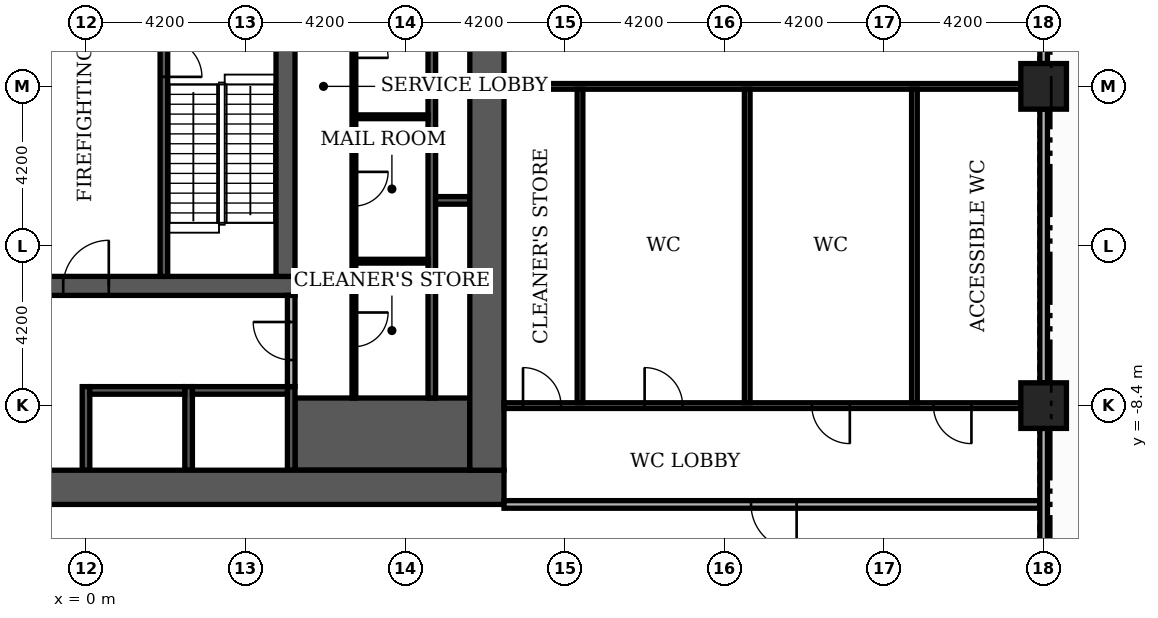
"""IFC4 building model, lengths in metres.
Left out: names, types, materials, properties, quantities, classifications, styles, units other than length and angle.
Written with IfcOpenShell. Run it as: python <this file> out.ifc"""

import sys

from ifc_helpers import new_model, si_unit, direction, frame, frame_2d, origin, origin_2d, place, context, subcontext, project, spatial, rectangle, extrude, element, fill, save


model = new_model("IFC4")
c1 = context("Model", 3, precision=1e-05, world=origin(), true_north=direction((0.0, 1.0)))
c2 = subcontext(c1, "Body", "Model", "MODEL_VIEW")
j1 = project(units=[si_unit("LENGTHUNIT", "METRE"), si_unit("PLANEANGLEUNIT", "RADIAN")], contexts=[c1])
p1 = place(None, origin())
s1 = spatial("IfcSite", under=j1, at=p1, CompositionType="ELEMENT")
p2 = place(p1, origin())
s2 = spatial("IfcBuilding", under=s1, at=p2, CompositionType="ELEMENT")
p3 = place(p2, frame((0.0, 0.0, 16.8)))
s3 = spatial("IfcBuildingStorey", under=s2, at=p3, CompositionType="ELEMENT", Elevation=16.8)
p4 = place(p3, frame((-5.5, -5.25, 0.0), z_axis=(0.0, 0.0, 1.0), x_axis=(1.0, 0.0, 0.0)))
e1 = element("IfcWall", 1, at=p4, inside=s3, PredefinedType="SHEAR", context=c2, shape_type="SweptSolid", body=[
    extrude(rectangle(XDim=11.0, YDim=0.5, at=frame_2d((5.5, 0.0))), origin(), (0.0, 0.0, 1.0), 4.98),
])
p5 = place(p4, frame((4.9, 0.0, 0.0)))
e2 = element("IfcOpeningElement", 2, at=p5, cuts=e1, PredefinedType="OPENING", context=c2, shape_type="SweptSolid", body=[
    extrude(rectangle(XDim=1.2, YDim=2.1, at=frame_2d((0.6, 1.05))), frame((0.0, 0.26, 0.0), z_axis=(0.0, -1.0, 0.0), x_axis=(1.0, 0.0, 0.0)), (0.0, 0.0, 1.0), 0.52),
])
p6 = place(p3, frame((5.25, -5.0, 0.0), z_axis=(0.0, 0.0, 1.0), x_axis=(0.0, 1.0, 0.0)))
e3 = element("IfcWall", 3, at=p6, inside=s3, PredefinedType="SHEAR", context=c2, shape_type="SweptSolid", body=[
    extrude(rectangle(XDim=10.5, YDim=0.5, at=frame_2d((5.25, 0.0))), origin(), (0.0, 0.0, 1.0), 4.98),
])
p7 = place(p3, frame((5.5, -9.15, 0.0), z_axis=(0.0, 0.0, 1.0), x_axis=(1.0, 0.0, 0.0)))
e4 = element("IfcWall", 4, at=p7, inside=s3, PredefinedType="SHEAR", context=c2, shape_type="SweptSolid", body=[
    extrude(rectangle(XDim=4.6, YDim=1.9, at=frame_2d((2.3, 0.0))), origin(), (0.0, 0.0, 1.0), 4.98),
])
p8 = place(p3, frame((2.05, -5.0, 0.0), z_axis=(0.0, 0.0, 1.0), x_axis=(0.0, 1.0, 0.0)))
e5 = element("IfcWall", 5, at=p8, inside=s3, PredefinedType="SHEAR", context=c2, shape_type="SweptSolid", body=[
    extrude(rectangle(XDim=6.6, YDim=0.2, at=frame_2d((3.3, 0.0))), origin(), (0.0, 0.0, 1.0), 4.98),
])
p9 = place(p8, frame((5.25, 0.0, 0.0)))
e6 = element("IfcOpeningElement", 6, at=p9, cuts=e5, PredefinedType="OPENING", context=c2, shape_type="SweptSolid", body=[
    extrude(rectangle(XDim=1.0, YDim=2.1, at=frame_2d((0.5, 1.05))), frame((0.0, 0.11, 0.0), z_axis=(0.0, -1.0, 0.0), x_axis=(1.0, 0.0, 0.0)), (0.0, 0.0, 1.0), 0.22),
])
for number, where, z_axis, x_axis in (
    (7, (0.0, -10.1, 0.0), (0.0, 0.0, 1.0), (0.0, 1.0, 0.0)),
    (8, (2.7, -10.1, 0.0), (0.0, 0.0, 1.0), (0.0, 1.0, 0.0)),
    (9, (5.4, -10.1, 0.0), (0.0, 0.0, 1.0), (0.0, 1.0, 0.0)),
):
    element("IfcWall", number, at=place(p3, frame(where, z_axis=z_axis, x_axis=x_axis)), inside=s3, PredefinedType="SHEAR", context=c2, shape_type="SweptSolid", body=[
        extrude(rectangle(XDim=2.2, YDim=0.2, at=frame_2d((1.1, 0.0))), origin(), (0.0, 0.0, 1.0), 4.98),
    ])
p10 = place(p3, frame((9.1, -8.2, 0.0), z_axis=(0.0, 0.0, 1.0), x_axis=(0.0, 1.0, 0.0)))
e10 = element("IfcWall", 10, at=p10, inside=s3, PredefinedType="SHEAR", context=c2, shape_type="SweptSolid", body=[
    extrude(rectangle(XDim=16.4, YDim=0.2, at=frame_2d((8.2, 0.0))), origin(), (0.0, 0.0, 1.0), 4.98),
])
for number, where, z_axis, x_axis in (
    (11, (0.1, -8.0, 0.0), (0.0, 0.0, 1.0), (1.0, 0.0, 0.0)),
    (12, (2.8, -8.0, 0.0), (0.0, 0.0, 1.0), (1.0, 0.0, 0.0)),
):
    element("IfcWall", number, at=place(p3, frame(where, z_axis=z_axis, x_axis=x_axis)), inside=s3, PredefinedType="SHEAR", context=c2, shape_type="SweptSolid", body=[
        extrude(rectangle(XDim=2.5, YDim=0.2, at=frame_2d((1.25, 0.0))), origin(), (0.0, 0.0, 1.0), 4.98),
    ])
p11 = place(p3, frame((9.2, -3.0, 0.0), z_axis=(0.0, 0.0, 1.0), x_axis=(1.0, 0.0, 0.0)))
e13 = element("IfcWall", 13, at=p11, inside=s3, PredefinedType="SHEAR", context=c2, shape_type="SweptSolid", body=[
    extrude(rectangle(XDim=0.9, YDim=0.2, at=frame_2d((0.45, 0.0))), origin(), (0.0, 0.0, 1.0), 4.98),
])
p12 = place(p3, frame((-11.0, -10.55, 0.0), z_axis=(0.0, 0.0, 1.0), x_axis=(1.0, 0.0, 0.0)))
e14 = element("IfcWall", 14, at=p12, inside=s3, PredefinedType="SHEAR", context=c2, shape_type="SweptSolid", body=[
    extrude(rectangle(XDim=22.0, YDim=0.9, at=frame_2d((11.0, 0.0))), origin(), (0.0, 0.0, 1.0), 4.98),
])
p13 = place(p12, frame((7.4, 0.0, 0.0)))
e15 = element("IfcOpeningElement", 15, at=p13, cuts=e14, PredefinedType="OPENING", context=c2, shape_type="SweptSolid", body=[
    extrude(rectangle(XDim=1.8, YDim=2.2, at=frame_2d((0.9, 1.1))), frame((0.0, 0.46, 0.0), z_axis=(0.0, -1.0, 0.0), x_axis=(1.0, 0.0, 0.0)), (0.0, 0.0, 1.0), 0.92),
])
p14 = place(p3, frame((10.55, -10.1, 0.0), z_axis=(0.0, 0.0, 1.0), x_axis=(0.0, 1.0, 0.0)))
e16 = element("IfcWall", 16, at=p14, inside=s3, PredefinedType="SHEAR", context=c2, shape_type="SweptSolid", body=[
    extrude(rectangle(XDim=20.2, YDim=0.9, at=frame_2d((10.1, 0.0))), origin(), (0.0, 0.0, 1.0), 4.98),
])
for number, where, z_axis, x_axis in (
    (17, (25.2, 0.0, 0.0), (0.0, 0.0, 1.0), (1.0, 0.0, 0.0)),
    (18, (25.2, -8.4, 0.0), (0.0, 0.0, 1.0), (1.0, 0.0, 0.0)),
):
    element("IfcColumn", number, at=place(p3, frame(where, z_axis=z_axis, x_axis=x_axis)), inside=s3, PredefinedType="COLUMN", context=c2, shape_type="SweptSolid", body=[
        extrude(rectangle(XDim=1.2, YDim=1.2, at=origin_2d()), origin(), (0.0, 0.0, 1.0), 5.4),
    ])
p15 = place(p3, frame((7.05, -8.2, 0.0), z_axis=(0.0, 0.0, 1.0), x_axis=(0.0, 1.0, 0.0)))
e19 = element("IfcWall", 19, at=p15, inside=s3, PredefinedType="PARTITIONING", context=c2, shape_type="SweptSolid", body=[
    extrude(rectangle(XDim=16.4, YDim=0.1, at=frame_2d((8.2, 0.0))), origin(), (0.0, 0.0, 1.0), 4.98),
])
p16 = place(p15, frame((1.35, 0.0, 0.0)))
e20 = element("IfcOpeningElement", 20, at=p16, cuts=e19, PredefinedType="OPENING", context=c2, shape_type="SweptSolid", body=[
    extrude(rectangle(XDim=0.9, YDim=2.1, at=frame_2d((0.45, 1.05))), frame((0.0, 0.06, 0.0), z_axis=(0.0, -1.0, 0.0), x_axis=(1.0, 0.0, 0.0)), (0.0, 0.0, 1.0), 0.12),
])
p17 = place(p15, frame((5.05, 0.0, 0.0)))
e21 = element("IfcOpeningElement", 21, at=p17, cuts=e19, PredefinedType="OPENING", context=c2, shape_type="SweptSolid", body=[
    extrude(rectangle(XDim=0.9, YDim=2.1, at=frame_2d((0.45, 1.05))), frame((0.0, 0.06, 0.0), z_axis=(0.0, -1.0, 0.0), x_axis=(1.0, 0.0, 0.0)), (0.0, 0.0, 1.0), 0.12),
])
p18 = place(p15, frame((8.95, 0.0, 0.0)))
e22 = element("IfcOpeningElement", 22, at=p18, cuts=e19, PredefinedType="OPENING", context=c2, shape_type="SweptSolid", body=[
    extrude(rectangle(XDim=0.9, YDim=2.1, at=frame_2d((0.45, 1.05))), frame((0.0, 0.06, 0.0), z_axis=(0.0, -1.0, 0.0), x_axis=(1.0, 0.0, 0.0)), (0.0, 0.0, 1.0), 0.12),
])
p19 = place(p15, frame((13.45, 0.0, 0.0)))
e23 = element("IfcOpeningElement", 23, at=p19, cuts=e19, PredefinedType="OPENING", context=c2, shape_type="SweptSolid", body=[
    extrude(rectangle(XDim=0.9, YDim=2.1, at=frame_2d((0.45, 1.05))), frame((0.0, 0.06, 0.0), z_axis=(0.0, -1.0, 0.0), x_axis=(1.0, 0.0, 0.0)), (0.0, 0.0, 1.0), 0.12),
])
p20 = place(p3, frame((5.4, -7.9, 0.0), z_axis=(0.0, 0.0, 1.0), x_axis=(0.0, 1.0, 0.0)))
e24 = element("IfcWall", 24, at=p20, inside=s3, PredefinedType="PARTITIONING", context=c2, shape_type="SweptSolid", body=[
    extrude(rectangle(XDim=2.4, YDim=0.2, at=frame_2d((1.2, 0.0))), origin(), (0.0, 0.0, 1.0), 4.98),
])
p21 = place(p20, frame((0.7, 0.0, 0.0)))
e25 = element("IfcOpeningElement", 25, at=p21, cuts=e24, PredefinedType="OPENING", context=c2, shape_type="SweptSolid", body=[
    extrude(rectangle(XDim=1.0, YDim=2.1, at=frame_2d((0.5, 1.05))), frame((0.0, 0.11, 0.0), z_axis=(0.0, -1.0, 0.0), x_axis=(1.0, 0.0, 0.0)), (0.0, 0.0, 1.0), 0.22),
])
for number, where, z_axis, x_axis in (
    (26, (7.1, -4.6, 0.0), (0.0, 0.0, 1.0), (1.0, 0.0, 0.0)),
    (27, (7.1, -0.8, 0.0), (0.0, 0.0, 1.0), (1.0, 0.0, 0.0)),
):
    element("IfcWall", number, at=place(p3, frame(where, z_axis=z_axis, x_axis=x_axis)), inside=s3, PredefinedType="PARTITIONING", context=c2, shape_type="SweptSolid", body=[
        extrude(rectangle(XDim=1.9, YDim=0.1, at=frame_2d((0.95, 0.0))), origin(), (0.0, 0.0, 1.0), 4.98),
    ])
p22 = place(p3, frame((11.0, -11.0, 0.0), z_axis=(0.0, 0.0, 1.0), x_axis=(1.0, 0.0, 0.0)))
e28 = element("IfcWall", 28, at=p22, inside=s3, PredefinedType="PARTITIONING", context=c2, shape_type="SweptSolid", body=[
    extrude(rectangle(XDim=14.1, YDim=0.2, at=frame_2d((7.05, 0.0))), origin(), (0.0, 0.0, 1.0), 4.98),
])
p23 = place(p22, frame((6.5, 0.0, 0.0)))
e29 = element("IfcOpeningElement", 29, at=p23, cuts=e28, PredefinedType="OPENING", context=c2, shape_type="SweptSolid", body=[
    extrude(rectangle(XDim=1.2, YDim=2.2, at=frame_2d((0.6, 1.1))), frame((0.0, 0.11, 0.0), z_axis=(0.0, -1.0, 0.0), x_axis=(1.0, 0.0, 0.0)), (0.0, 0.0, 1.0), 0.22),
])
p24 = place(p3, frame((11.0, -8.4, 0.0), z_axis=(0.0, 0.0, 1.0), x_axis=(1.0, 0.0, 0.0)))
e30 = element("IfcWall", 30, at=p24, inside=s3, PredefinedType="PARTITIONING", context=c2, shape_type="SweptSolid", body=[
    extrude(rectangle(XDim=13.6, YDim=0.15, at=frame_2d((6.8, 0.0))), origin(), (0.0, 0.0, 1.0), 4.98),
])
p25 = place(p24, frame((0.5, 0.0, 0.0)))
e31 = element("IfcOpeningElement", 31, at=p25, cuts=e30, PredefinedType="OPENING", context=c2, shape_type="SweptSolid", body=[
    extrude(rectangle(XDim=1.0, YDim=2.1, at=frame_2d((0.5, 1.05))), frame((0.0, 0.085, 0.0), z_axis=(0.0, -1.0, 0.0), x_axis=(1.0, 0.0, 0.0)), (0.0, 0.0, 1.0), 0.17),
])
p26 = place(p24, frame((3.7, 0.0, 0.0)))
e32 = element("IfcOpeningElement", 32, at=p26, cuts=e30, PredefinedType="OPENING", context=c2, shape_type="SweptSolid", body=[
    extrude(rectangle(XDim=1.0, YDim=2.1, at=frame_2d((0.5, 1.05))), frame((0.0, 0.085, 0.0), z_axis=(0.0, -1.0, 0.0), x_axis=(1.0, 0.0, 0.0)), (0.0, 0.0, 1.0), 0.17),
])
p27 = place(p24, frame((8.1, 0.0, 0.0)))
e33 = element("IfcOpeningElement", 33, at=p27, cuts=e30, PredefinedType="OPENING", context=c2, shape_type="SweptSolid", body=[
    extrude(rectangle(XDim=1.0, YDim=2.1, at=frame_2d((0.5, 1.05))), frame((0.0, 0.085, 0.0), z_axis=(0.0, -1.0, 0.0), x_axis=(1.0, 0.0, 0.0)), (0.0, 0.0, 1.0), 0.17),
])
p28 = place(p24, frame((11.3, 0.0, 0.0)))
e34 = element("IfcOpeningElement", 34, at=p28, cuts=e30, PredefinedType="OPENING", context=c2, shape_type="SweptSolid", body=[
    extrude(rectangle(XDim=1.0, YDim=2.1, at=frame_2d((0.5, 1.05))), frame((0.0, 0.085, 0.0), z_axis=(0.0, -1.0, 0.0), x_axis=(1.0, 0.0, 0.0)), (0.0, 0.0, 1.0), 0.17),
])
p29 = place(p3, frame((11.0, 0.0, 0.0), z_axis=(0.0, 0.0, 1.0), x_axis=(1.0, 0.0, 0.0)))
e35 = element("IfcWall", 35, at=p29, inside=s3, PredefinedType="PARTITIONING", context=c2, shape_type="SweptSolid", body=[
    extrude(rectangle(XDim=13.6, YDim=0.15, at=frame_2d((6.8, 0.0))), origin(), (0.0, 0.0, 1.0), 4.98),
])
for number, where, z_axis, x_axis in (
    (36, (13.0, -8.325, 0.0), (0.0, 0.0, 1.0), (0.0, 1.0, 0.0)),
    (37, (17.4, -8.325, 0.0), (0.0, 0.0, 1.0), (0.0, 1.0, 0.0)),
    (38, (21.8, -8.325, 0.0), (0.0, 0.0, 1.0), (0.0, 1.0, 0.0)),
):
    element("IfcWall", number, at=place(p3, frame(where, z_axis=z_axis, x_axis=x_axis)), inside=s3, PredefinedType="PARTITIONING", context=c2, shape_type="SweptSolid", body=[
        extrude(rectangle(XDim=8.25, YDim=0.15, at=frame_2d((4.125, 0.0))), origin(), (0.0, 0.0, 1.0), 4.98),
    ])
p30 = place(p3, frame((25.2, -16.2, 0.0), z_axis=(0.0, 0.0, 1.0), x_axis=(0.0, 1.0, 0.0)))
e39 = element("IfcWall", 39, at=p30, inside=s3, PredefinedType="PARTITIONING", context=c2, shape_type="SweptSolid", body=[
    extrude(rectangle(XDim=7.2, YDim=0.2, at=frame_2d((3.6, 0.0))), origin(), (0.0, 0.0, 1.0), 4.68),
])
p31 = place(p30, frame((1.5, 0.0, 0.0)))
e40 = element("IfcOpeningElement", 40, at=p31, cuts=e39, PredefinedType="OPENING", context=c2, shape_type="SweptSolid", body=[
    extrude(rectangle(XDim=1.8, YDim=2.2, at=frame_2d((0.9, 1.1))), frame((0.0, 0.11, 0.0), z_axis=(0.0, -1.0, 0.0), x_axis=(1.0, 0.0, 0.0)), (0.0, 0.0, 1.0), 0.22),
])
for number, where, z_axis, x_axis in (
    (41, (25.2, -7.8, 0.0), (0.0, 0.0, 1.0), (0.0, 1.0, 0.0)),
    (42, (25.2, 0.6, 0.0), (0.0, 0.0, 1.0), (0.0, 1.0, 0.0)),
):
    element("IfcWall", number, at=place(p3, frame(where, z_axis=z_axis, x_axis=x_axis)), inside=s3, PredefinedType="PARTITIONING", context=c2, shape_type="SweptSolid", body=[
        extrude(rectangle(XDim=7.2, YDim=0.2, at=frame_2d((3.6, 0.0))), origin(), (0.0, 0.0, 1.0), 4.68),
    ])
p32 = place(p9, frame((1.0, 0.0, 0.0), z_axis=(0.0, 0.0, 1.0), x_axis=(-1.0, 0.0, 0.0)))
e43 = element("IfcDoor", 43, at=p32, inside=s3, OperationType="SINGLE_SWING_LEFT", PredefinedType="DOOR", context=c2, shape_type="SweptSolid", body=[
    extrude(rectangle(XDim=1.0, YDim=2.1, at=frame_2d((0.5, 1.05))), frame((0.0, 0.025, 0.0), z_axis=(0.0, -1.0, 0.0), x_axis=(1.0, 0.0, 0.0)), (0.0, 0.0, 1.0), 0.05),
])
fill(e6, e43)
p33 = place(p5, origin())
e44 = element("IfcDoor", 44, at=p33, inside=s3, OperationType="SINGLE_SWING_RIGHT", PredefinedType="DOOR", context=c2, shape_type="SweptSolid", body=[
    extrude(rectangle(XDim=1.2, YDim=2.1, at=frame_2d((0.6, 1.05))), frame((0.0, 0.025, 0.0), z_axis=(0.0, -1.0, 0.0), x_axis=(1.0, 0.0, 0.0)), (0.0, 0.0, 1.0), 0.05),
])
fill(e2, e44)
p34 = place(p21, origin())
e45 = element("IfcDoor", 45, at=p34, inside=s3, OperationType="SINGLE_SWING_RIGHT", PredefinedType="DOOR", context=c2, shape_type="SweptSolid", body=[
    extrude(rectangle(XDim=1.0, YDim=2.1, at=frame_2d((0.5, 1.05))), frame((0.0, 0.025, 0.0), z_axis=(0.0, -1.0, 0.0), x_axis=(1.0, 0.0, 0.0)), (0.0, 0.0, 1.0), 0.05),
])
fill(e25, e45)
p35 = place(p16, frame((0.9, 0.0, 0.0), z_axis=(0.0, 0.0, 1.0), x_axis=(-1.0, 0.0, 0.0)))
e46 = element("IfcDoor", 46, at=p35, inside=s3, OperationType="SINGLE_SWING_RIGHT", PredefinedType="DOOR", context=c2, shape_type="SweptSolid", body=[
    extrude(rectangle(XDim=0.9, YDim=2.1, at=frame_2d((0.45, 1.05))), frame((0.0, 0.025, 0.0), z_axis=(0.0, -1.0, 0.0), x_axis=(1.0, 0.0, 0.0)), (0.0, 0.0, 1.0), 0.05),
])
fill(e20, e46)
p36 = place(p17, frame((0.9, 0.0, 0.0), z_axis=(0.0, 0.0, 1.0), x_axis=(-1.0, 0.0, 0.0)))
e47 = element("IfcDoor", 47, at=p36, inside=s3, OperationType="SINGLE_SWING_RIGHT", PredefinedType="DOOR", context=c2, shape_type="SweptSolid", body=[
    extrude(rectangle(XDim=0.9, YDim=2.1, at=frame_2d((0.45, 1.05))), frame((0.0, 0.025, 0.0), z_axis=(0.0, -1.0, 0.0), x_axis=(1.0, 0.0, 0.0)), (0.0, 0.0, 1.0), 0.05),
])
fill(e21, e47)
p37 = place(p18, frame((0.9, 0.0, 0.0), z_axis=(0.0, 0.0, 1.0), x_axis=(-1.0, 0.0, 0.0)))
e48 = element("IfcDoor", 48, at=p37, inside=s3, OperationType="SINGLE_SWING_LEFT", PredefinedType="DOOR", context=c2, shape_type="SweptSolid", body=[
    extrude(rectangle(XDim=0.9, YDim=2.1, at=frame_2d((0.45, 1.05))), frame((0.0, 0.025, 0.0), z_axis=(0.0, -1.0, 0.0), x_axis=(1.0, 0.0, 0.0)), (0.0, 0.0, 1.0), 0.05),
])
fill(e22, e48)
p38 = place(p23, origin())
e49 = element("IfcDoor", 49, at=p38, inside=s3, OperationType="SINGLE_SWING_RIGHT", PredefinedType="DOOR", context=c2, shape_type="SweptSolid", body=[
    extrude(rectangle(XDim=1.2, YDim=2.2, at=frame_2d((0.6, 1.1))), frame((0.0, 0.025, 0.0), z_axis=(0.0, -1.0, 0.0), x_axis=(1.0, 0.0, 0.0)), (0.0, 0.0, 1.0), 0.05),
])
fill(e29, e49)
p39 = place(p25, origin())
e50 = element("IfcDoor", 50, at=p39, inside=s3, OperationType="SINGLE_SWING_LEFT", PredefinedType="DOOR", context=c2, shape_type="SweptSolid", body=[
    extrude(rectangle(XDim=1.0, YDim=2.1, at=frame_2d((0.5, 1.05))), frame((0.0, 0.025, 0.0), z_axis=(0.0, -1.0, 0.0), x_axis=(1.0, 0.0, 0.0)), (0.0, 0.0, 1.0), 0.05),
])
fill(e31, e50)
p40 = place(p26, origin())
e51 = element("IfcDoor", 51, at=p40, inside=s3, OperationType="SINGLE_SWING_LEFT", PredefinedType="DOOR", context=c2, shape_type="SweptSolid", body=[
    extrude(rectangle(XDim=1.0, YDim=2.1, at=frame_2d((0.5, 1.05))), frame((0.0, 0.025, 0.0), z_axis=(0.0, -1.0, 0.0), x_axis=(1.0, 0.0, 0.0)), (0.0, 0.0, 1.0), 0.05),
])
fill(e32, e51)
p41 = place(p27, origin())
e52 = element("IfcDoor", 52, at=p41, inside=s3, OperationType="SINGLE_SWING_RIGHT", PredefinedType="DOOR", context=c2, shape_type="SweptSolid", body=[
    extrude(rectangle(XDim=1.0, YDim=2.1, at=frame_2d((0.5, 1.05))), frame((0.0, 0.025, 0.0), z_axis=(0.0, -1.0, 0.0), x_axis=(1.0, 0.0, 0.0)), (0.0, 0.0, 1.0), 0.05),
])
fill(e33, e52)
p42 = place(p28, origin())
e53 = element("IfcDoor", 53, at=p42, inside=s3, OperationType="SINGLE_SWING_RIGHT", PredefinedType="DOOR", context=c2, shape_type="SweptSolid", body=[
    extrude(rectangle(XDim=1.0, YDim=2.1, at=frame_2d((0.5, 1.05))), frame((0.0, 0.025, 0.0), z_axis=(0.0, -1.0, 0.0), x_axis=(1.0, 0.0, 0.0)), (0.0, 0.0, 1.0), 0.05),
])
fill(e34, e53)
save(model, sys.argv[1])
